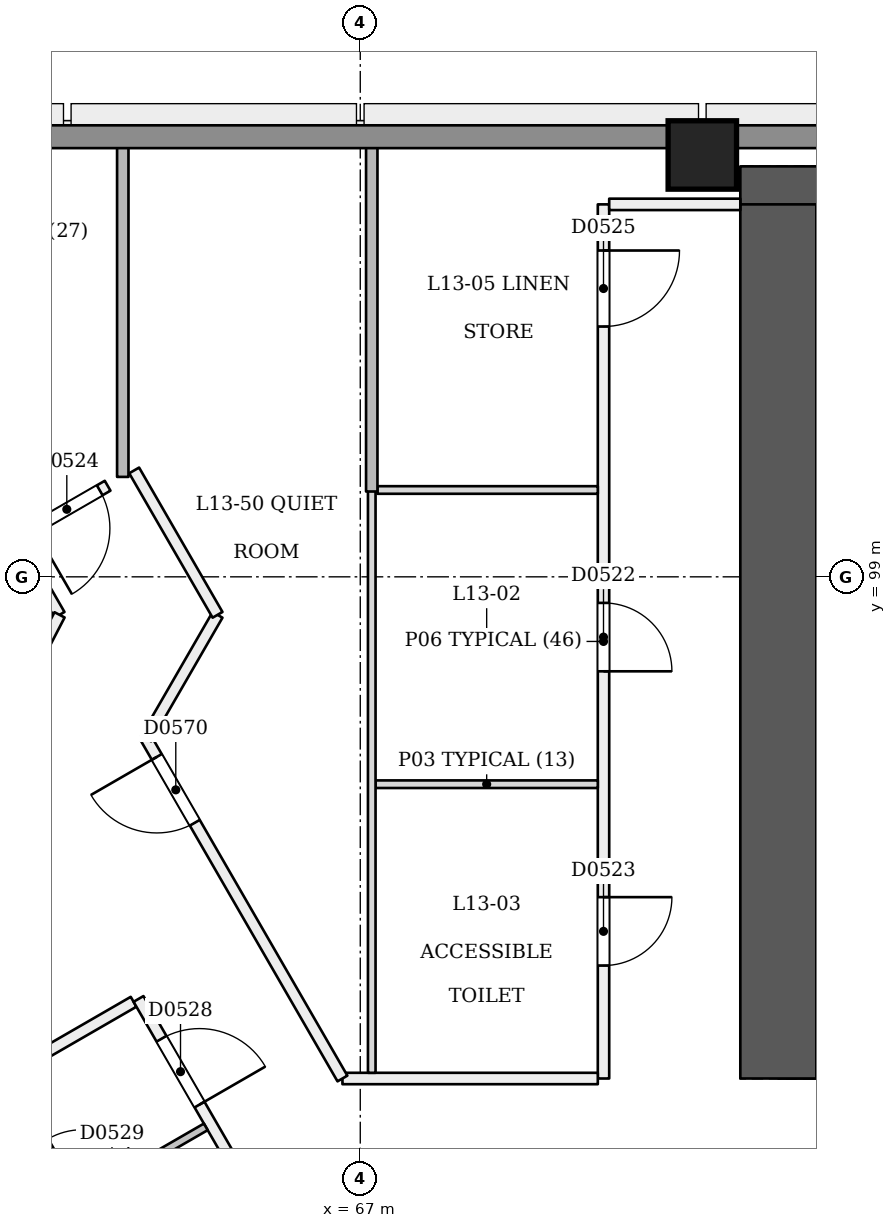
"""IFC4 building model, lengths in metres.
Left out: names, types, materials, properties, quantities, classifications, styles, units other than length and angle.
Written with IfcOpenShell. Run it as: python <this file> out.ifc"""

import sys

from ifc_helpers import new_model, si_unit, direction, frame, frame_2d, origin, origin_2d, place, context, subcontext, project, spatial, rectangle, extrude, element, fill, save


model = new_model("IFC4")
c1 = context("Model", 3, precision=1e-05, world=origin(), true_north=direction((0.0, 1.0)))
c2 = subcontext(c1, "Body", "Model", "MODEL_VIEW")
j1 = project(units=[si_unit("LENGTHUNIT", "METRE"), si_unit("PLANEANGLEUNIT", "RADIAN")], contexts=[c1])
p1 = place(None, origin())
s1 = spatial("IfcSite", under=j1, at=p1, CompositionType="ELEMENT")
p2 = place(p1, origin())
s2 = spatial("IfcBuilding", under=s1, at=p2, CompositionType="ELEMENT")
p3 = place(p2, frame((0.0, 0.0, 55.8)))
s3 = spatial("IfcBuildingStorey", under=s2, at=p3, CompositionType="ELEMENT", Elevation=55.8)
p4 = place(p3, frame((72.5, 92.9, 0.0), z_axis=(0.0, 0.0, 1.0), x_axis=(1.0, 0.0, 0.0)))
e1 = element("IfcWall", 1, at=p4, inside=s3, PredefinedType="SHEAR", context=c2, shape_type="SweptSolid", body=[
    extrude(rectangle(XDim=25.5, YDim=1.0, at=frame_2d((12.75, 0.0))), origin(), (0.0, 0.0, 1.0), 3.6),
])
p5 = place(p4, frame((1.3, 0.0, 0.0)))
e2 = element("IfcOpeningElement", 2, at=p5, cuts=e1, PredefinedType="OPENING", context=c2, shape_type="SweptSolid", body=[
    extrude(rectangle(XDim=1.2, YDim=2.1, at=frame_2d((0.6, 1.05))), frame((0.0, 0.51, 0.0), z_axis=(0.0, -1.0, 0.0), x_axis=(1.0, 0.0, 0.0)), (0.0, 0.0, 1.0), 1.021),
])
p6 = place(p4, frame((3.5, 0.0, 0.0)))
e3 = element("IfcOpeningElement", 3, at=p6, cuts=e1, PredefinedType="OPENING", context=c2, shape_type="SweptSolid", body=[
    extrude(rectangle(XDim=1.2, YDim=2.1, at=frame_2d((0.6, 1.05))), frame((0.0, 0.51, 0.0), z_axis=(0.0, -1.0, 0.0), x_axis=(1.0, 0.0, 0.0)), (0.0, 0.0, 1.0), 1.021),
])
p7 = place(p4, frame((13.5, 0.0, 0.0)))
e4 = element("IfcOpeningElement", 4, at=p7, cuts=e1, PredefinedType="OPENING", context=c2, shape_type="SweptSolid", body=[
    extrude(rectangle(XDim=1.2, YDim=2.1, at=frame_2d((0.6, 1.05))), frame((0.0, 0.51, 0.0), z_axis=(0.0, -1.0, 0.0), x_axis=(1.0, 0.0, 0.0)), (0.0, 0.0, 1.0), 1.021),
])
p8 = place(p4, frame((15.462, 0.0, 0.0)))
e5 = element("IfcOpeningElement", 5, at=p8, cuts=e1, PredefinedType="OPENING", context=c2, shape_type="SweptSolid", body=[
    extrude(rectangle(XDim=1.0, YDim=2.1, at=frame_2d((0.5, 1.05))), frame((0.0, 0.51, 0.0), z_axis=(0.0, -1.0, 0.0), x_axis=(1.0, 0.0, 0.0)), (0.0, 0.0, 1.0), 1.021),
])
p9 = place(p4, frame((18.3, 0.0, 0.0)))
e6 = element("IfcOpeningElement", 6, at=p9, cuts=e1, PredefinedType="OPENING", context=c2, shape_type="SweptSolid", body=[
    extrude(rectangle(XDim=1.0, YDim=2.1, at=frame_2d((0.5, 1.05))), frame((0.0, 0.51, 0.0), z_axis=(0.0, -1.0, 0.0), x_axis=(1.0, 0.0, 0.0)), (0.0, 0.0, 1.0), 1.021),
])
p10 = place(p4, frame((21.2, 0.0, 0.0)))
e7 = element("IfcOpeningElement", 7, at=p10, cuts=e1, PredefinedType="OPENING", context=c2, shape_type="SweptSolid", body=[
    extrude(rectangle(XDim=1.0, YDim=2.1, at=frame_2d((0.5, 1.05))), frame((0.0, 0.51, 0.0), z_axis=(0.0, -1.0, 0.0), x_axis=(1.0, 0.0, 0.0)), (0.0, 0.0, 1.0), 1.021),
])
p11 = place(p4, frame((23.087, 0.0, 0.0)))
e8 = element("IfcOpeningElement", 8, at=p11, cuts=e1, PredefinedType="OPENING", context=c2, shape_type="SweptSolid", body=[
    extrude(rectangle(XDim=1.0, YDim=2.1, at=frame_2d((0.5, 1.05))), frame((0.0, 0.51, 0.0), z_axis=(0.0, -1.0, 0.0), x_axis=(1.0, 0.0, 0.0)), (0.0, 0.0, 1.0), 1.021),
])
p12 = place(p3, frame((97.5, 103.9, 0.0), z_axis=(0.0, 0.0, 1.0), x_axis=(-1.0, 0.0, 0.0)))
e9 = element("IfcWall", 9, at=p12, inside=s3, PredefinedType="SHEAR", context=c2, shape_type="SweptSolid", body=[
    extrude(rectangle(XDim=25.5, YDim=1.0, at=frame_2d((12.75, 0.0))), origin(), (0.0, 0.0, 1.0), 3.6),
])
p13 = place(p3, frame((72.5, 103.9, 0.0), z_axis=(0.0, 0.0, 1.0), x_axis=(0.0, -1.0, 0.0)))
e10 = element("IfcWall", 10, at=p13, inside=s3, PredefinedType="SHEAR", context=c2, shape_type="SweptSolid", body=[
    extrude(rectangle(XDim=11.5, YDim=1.0, at=frame_2d((5.75, 0.0))), origin(), (0.0, 0.0, 1.0), 3.6),
])
p14 = place(p3, frame((71.5, 104.55, 0.0), z_axis=(0.0, 0.0, 1.0), x_axis=(1.0, 0.0, 0.0)))
e11 = element("IfcColumn", 11, at=p14, inside=s3, PredefinedType="COLUMN", context=c2, shape_type="SweptSolid", body=[
    extrude(rectangle(XDim=0.9, YDim=0.9, at=origin_2d()), origin(), (0.0, 0.0, 1.0), 3.6),
])
p15 = place(p3, frame((70.2, 103.9, 0.0), z_axis=(0.0, 0.0, 1.0), x_axis=(0.0, -1.0, 0.0)))
e12 = element("IfcWall", 12, at=p15, inside=s3, PredefinedType="PARTITIONING", context=c2, shape_type="SweptSolid", body=[
    extrude(rectangle(XDim=11.5, YDim=0.15, at=frame_2d((5.75, 0.0))), origin(), (0.0, 0.0, 1.0), 2.6),
])
p16 = place(p15, frame((5.243, 0.0, 0.0)))
e13 = element("IfcOpeningElement", 13, at=p16, cuts=e12, PredefinedType="OPENING", context=c2, shape_type="SweptSolid", body=[
    extrude(rectangle(XDim=0.9, YDim=2.1, at=frame_2d((0.45, 1.05))), frame((0.0, 0.085, 0.0), z_axis=(0.0, -1.0, 0.0), x_axis=(1.0, 0.0, 0.0)), (0.0, 0.0, 1.0), 0.171),
])
p17 = place(p15, frame((9.114, 0.0, 0.0)))
e14 = element("IfcOpeningElement", 14, at=p17, cuts=e12, PredefinedType="OPENING", context=c2, shape_type="SweptSolid", body=[
    extrude(rectangle(XDim=0.9, YDim=2.1, at=frame_2d((0.45, 1.05))), frame((0.0, 0.085, 0.0), z_axis=(0.0, -1.0, 0.0), x_axis=(1.0, 0.0, 0.0)), (0.0, 0.0, 1.0), 0.171),
])
p18 = place(p15, frame((0.607, 0.0, 0.0)))
e15 = element("IfcOpeningElement", 15, at=p18, cuts=e12, PredefinedType="OPENING", context=c2, shape_type="SweptSolid", body=[
    extrude(rectangle(XDim=1.0, YDim=2.1, at=frame_2d((0.5, 1.05))), frame((0.0, 0.085, 0.0), z_axis=(0.0, -1.0, 0.0), x_axis=(1.0, 0.0, 0.0)), (0.0, 0.0, 1.0), 0.171),
])
p19 = place(p3, frame((70.125, 92.4, 0.0), z_axis=(0.0, 0.0, 1.0), x_axis=(-1.0, 0.0, 0.0)))
e16 = element("IfcWall", 16, at=p19, inside=s3, PredefinedType="PARTITIONING", context=c2, shape_type="SweptSolid", body=[
    extrude(rectangle(XDim=3.36, YDim=0.15, at=frame_2d((1.68, 0.0))), origin(), (0.0, 0.0, 1.0), 3.1),
])
p20 = place(p3, frame((63.676, 100.198, 0.0), z_axis=(0.0, 0.0, 1.0), x_axis=(-0.865994851461, -0.500052914442, 0.0)))
e17 = element("IfcWall", 17, at=p20, inside=s3, PredefinedType="PARTITIONING", context=c2, shape_type="SweptSolid", body=[
    extrude(rectangle(XDim=1.322, YDim=0.15, at=frame_2d((0.661, 0.0))), origin(), (0.0, 0.0, 1.0), 3.1),
])
p21 = place(p20, frame((0.12, 0.0, 0.0)))
e18 = element("IfcOpeningElement", 18, at=p21, cuts=e17, PredefinedType="OPENING", context=c2, shape_type="SweptSolid", body=[
    extrude(rectangle(XDim=1.0, YDim=2.1, at=frame_2d((0.5, 1.05))), frame((0.0, 0.085, 0.0), z_axis=(0.0, -1.0, 0.0), x_axis=(1.0, 0.0, 0.0)), (0.0, 0.0, 1.0), 0.171),
])
p22 = place(p3, frame((72.0, 103.9, 0.0), z_axis=(0.0, 0.0, 1.0), x_axis=(-1.0, 0.0, 0.0)))
e19 = element("IfcWall", 19, at=p22, inside=s3, PredefinedType="PARTITIONING", context=c2, shape_type="SweptSolid", body=[
    extrude(rectangle(XDim=1.725, YDim=0.15, at=frame_2d((0.863, 0.0))), origin(), (0.0, 0.0, 1.0), 2.6),
])
p23 = place(p3, frame((62.504, 99.435, 0.0), z_axis=(0.0, 0.0, 1.0), x_axis=(0.499957341738, -0.866050031143, 0.0)))
e20 = element("IfcWall", 20, at=p23, inside=s3, PredefinedType="PARTITIONING", context=c2, shape_type="SweptSolid", body=[
    extrude(rectangle(XDim=1.08, YDim=0.15, at=frame_2d((0.54, 0.0))), origin(), (0.0, 0.0, 1.0), 3.1),
])
p24 = place(p3, frame((63.044, 98.5, 0.0), z_axis=(0.0, 0.0, 1.0), x_axis=(-0.459959252293, -0.887940024005, 0.0)))
e21 = element("IfcWall", 21, at=p24, inside=s3, PredefinedType="PARTITIONING", context=c2, shape_type="SweptSolid", body=[
    extrude(rectangle(XDim=1.932, YDim=0.15, at=frame_2d((0.966, 0.0))), origin(), (0.0, 0.0, 1.0), 3.1),
])
p25 = place(p3, frame((62.628, 92.607, 0.0), z_axis=(0.0, 0.0, 1.0), x_axis=(0.866015857963, 0.500016533484, 0.0)))
e22 = element("IfcWall", 22, at=p25, inside=s3, PredefinedType="PARTITIONING", context=c2, shape_type="SweptSolid", body=[
    extrude(rectangle(XDim=1.605, YDim=0.15, at=frame_2d((0.802, 0.0))), origin(), (0.0, 0.0, 1.0), 3.1),
])
p26 = place(p3, frame((64.083, 93.447, 0.0), z_axis=(0.0, 0.0, 1.0), x_axis=(0.5000018851, -0.866024315419, 0.0)))
e23 = element("IfcWall", 23, at=p26, inside=s3, PredefinedType="PARTITIONING", context=c2, shape_type="SweptSolid", body=[
    extrude(rectangle(XDim=36.0, YDim=0.15, at=frame_2d((18.0, 0.0))), origin(), (0.0, 0.0, 1.0), 2.7),
])
p27 = place(p26, frame((0.605, 0.0, 0.0)))
e24 = element("IfcOpeningElement", 24, at=p27, cuts=e23, PredefinedType="OPENING", context=c2, shape_type="SweptSolid", body=[
    extrude(rectangle(XDim=1.0, YDim=2.1, at=frame_2d((0.5, 1.05))), frame((0.0, 0.085, 0.0), z_axis=(0.0, -1.0, 0.0), x_axis=(1.0, 0.0, 0.0)), (0.0, 0.0, 1.0), 0.171),
])
p28 = place(p26, frame((7.28, 0.0, 0.0)))
e25 = element("IfcOpeningElement", 25, at=p28, cuts=e23, PredefinedType="OPENING", context=c2, shape_type="SweptSolid", body=[
    extrude(rectangle(XDim=1.0, YDim=2.1, at=frame_2d((0.5, 1.05))), frame((0.0, 0.085, 0.0), z_axis=(0.0, -1.0, 0.0), x_axis=(1.0, 0.0, 0.0)), (0.0, 0.0, 1.0), 0.171),
])
p29 = place(p26, frame((9.72, 0.0, 0.0)))
e26 = element("IfcOpeningElement", 26, at=p29, cuts=e23, PredefinedType="OPENING", context=c2, shape_type="SweptSolid", body=[
    extrude(rectangle(XDim=1.0, YDim=2.1, at=frame_2d((0.5, 1.05))), frame((0.0, 0.085, 0.0), z_axis=(0.0, -1.0, 0.0), x_axis=(1.0, 0.0, 0.0)), (0.0, 0.0, 1.0), 0.171),
])
p30 = place(p26, frame((16.395, 0.0, 0.0)))
e27 = element("IfcOpeningElement", 27, at=p30, cuts=e23, PredefinedType="OPENING", context=c2, shape_type="SweptSolid", body=[
    extrude(rectangle(XDim=1.0, YDim=2.1, at=frame_2d((0.5, 1.05))), frame((0.0, 0.085, 0.0), z_axis=(0.0, -1.0, 0.0), x_axis=(1.0, 0.0, 0.0)), (0.0, 0.0, 1.0), 0.171),
])
p31 = place(p26, frame((18.72, 0.0, 0.0)))
e28 = element("IfcOpeningElement", 28, at=p31, cuts=e23, PredefinedType="OPENING", context=c2, shape_type="SweptSolid", body=[
    extrude(rectangle(XDim=1.0, YDim=2.1, at=frame_2d((0.5, 1.05))), frame((0.0, 0.085, 0.0), z_axis=(0.0, -1.0, 0.0), x_axis=(1.0, 0.0, 0.0)), (0.0, 0.0, 1.0), 0.171),
])
p32 = place(p26, frame((25.395, 0.0, 0.0)))
e29 = element("IfcOpeningElement", 29, at=p32, cuts=e23, PredefinedType="OPENING", context=c2, shape_type="SweptSolid", body=[
    extrude(rectangle(XDim=1.0, YDim=2.1, at=frame_2d((0.5, 1.05))), frame((0.0, 0.085, 0.0), z_axis=(0.0, -1.0, 0.0), x_axis=(1.0, 0.0, 0.0)), (0.0, 0.0, 1.0), 0.171),
])
p33 = place(p26, frame((27.605, 0.0, 0.0)))
e30 = element("IfcOpeningElement", 30, at=p33, cuts=e23, PredefinedType="OPENING", context=c2, shape_type="SweptSolid", body=[
    extrude(rectangle(XDim=1.0, YDim=2.1, at=frame_2d((0.5, 1.05))), frame((0.0, 0.085, 0.0), z_axis=(0.0, -1.0, 0.0), x_axis=(1.0, 0.0, 0.0)), (0.0, 0.0, 1.0), 0.171),
])
p34 = place(p26, frame((34.28, 0.0, 0.0)))
e31 = element("IfcOpeningElement", 31, at=p34, cuts=e23, PredefinedType="OPENING", context=c2, shape_type="SweptSolid", body=[
    extrude(rectangle(XDim=1.0, YDim=2.1, at=frame_2d((0.5, 1.05))), frame((0.0, 0.085, 0.0), z_axis=(0.0, -1.0, 0.0), x_axis=(1.0, 0.0, 0.0)), (0.0, 0.0, 1.0), 0.171),
])
p35 = place(p3, frame((66.765, 92.4, 0.0), z_axis=(0.0, 0.0, 1.0), x_axis=(-0.499992497538, 0.86602973529, 0.0)))
e32 = element("IfcWall", 32, at=p35, inside=s3, PredefinedType="PARTITIONING", context=c2, shape_type="SweptSolid", body=[
    extrude(rectangle(XDim=5.165, YDim=0.15, at=frame_2d((2.583, 0.0))), origin(), (0.0, 0.0, 1.0), 3.1),
])
p36 = place(p35, frame((3.885, 0.0, 0.0)))
e33 = element("IfcOpeningElement", 33, at=p36, cuts=e32, PredefinedType="OPENING", context=c2, shape_type="SweptSolid", body=[
    extrude(rectangle(XDim=1.0, YDim=2.1, at=frame_2d((0.5, 1.05))), frame((0.0, 0.085, 0.0), z_axis=(0.0, -1.0, 0.0), x_axis=(1.0, 0.0, 0.0)), (0.0, 0.0, 1.0), 0.171),
])
p37 = place(p3, frame((64.183, 96.873, 0.0), z_axis=(0.0, 0.0, 1.0), x_axis=(0.500052415518, 0.865995139556, 0.0)))
e34 = element("IfcWall", 34, at=p37, inside=s3, PredefinedType="PARTITIONING", context=c2, shape_type="SweptSolid", body=[
    extrude(rectangle(XDim=1.879, YDim=0.15, at=frame_2d((0.939, 0.0))), origin(), (0.0, 0.0, 1.0), 3.1),
])
p38 = place(p3, frame((65.122, 98.5, 0.0), z_axis=(0.0, 0.0, 1.0), x_axis=(-0.500005024956, 0.866022502605, 0.0)))
e35 = element("IfcWall", 35, at=p38, inside=s3, PredefinedType="PARTITIONING", context=c2, shape_type="SweptSolid", body=[
    extrude(rectangle(XDim=2.194, YDim=0.15, at=frame_2d((1.097, 0.0))), origin(), (0.0, 0.0, 1.0), 3.1),
])
p39 = place(p3, frame((67.201, 96.272, 0.0), z_axis=(0.0, 0.0, 1.0), x_axis=(1.0, 0.0, 0.0)))
e36 = element("IfcWall", 36, at=p39, inside=s3, PredefinedType="PARTITIONING", context=c2, shape_type="SweptSolid", body=[
    extrude(rectangle(XDim=2.924, YDim=0.1, at=frame_2d((1.462, 0.0))), origin(), (0.0, 0.0, 1.0), 3.1),
])
p40 = place(p3, frame((70.125, 100.143, 0.0), z_axis=(0.0, 0.0, 1.0), x_axis=(-1.0, 0.0, 0.0)))
e37 = element("IfcWall", 37, at=p40, inside=s3, PredefinedType="PARTITIONING", context=c2, shape_type="SweptSolid", body=[
    extrude(rectangle(XDim=2.899, YDim=0.1, at=frame_2d((1.449, 0.0))), origin(), (0.0, 0.0, 1.0), 3.1),
])
p41 = place(p3, frame((67.151, 100.163, 0.0), z_axis=(0.0, 0.0, 1.0), x_axis=(0.0, -1.0, 0.0)))
e38 = element("IfcWall", 38, at=p41, inside=s3, PredefinedType="PARTITIONING", context=c2, shape_type="SweptSolid", body=[
    extrude(rectangle(XDim=7.688, YDim=0.1, at=frame_2d((3.844, 0.0))), origin(), (0.0, 0.0, 1.0), 3.1),
])
p42 = place(p3, frame((63.875, 100.315, 0.0), z_axis=(0.0, 0.0, 1.0), x_axis=(0.0, 1.0, 0.0)))
e39 = element("IfcWall", 39, at=p42, inside=s3, PredefinedType="PARTITIONING", context=c2, shape_type="SweptSolid", body=[
    extrude(rectangle(XDim=4.585, YDim=0.15, at=frame_2d((2.292, 0.0))), origin(), (0.0, 0.0, 1.0), 2.6),
])
p43 = place(p3, frame((67.151, 104.9, 0.0), z_axis=(0.0, 0.0, 1.0), x_axis=(0.0, -1.0, 0.0)))
e40 = element("IfcWall", 40, at=p43, inside=s3, PredefinedType="PARTITIONING", context=c2, shape_type="SweptSolid", body=[
    extrude(rectangle(XDim=4.777, YDim=0.15, at=frame_2d((2.389, 0.0))), origin(), (0.0, 0.0, 1.0), 2.6),
])
p44 = place(p3, frame((62.435, 90.301, 0.0), z_axis=(0.0, 0.0, 1.0), x_axis=(0.865989585315, 0.500062034277, 0.0)))
e41 = element("IfcWall", 41, at=p44, inside=s3, PredefinedType="PARTITIONING", context=c2, shape_type="SweptSolid", body=[
    extrude(rectangle(XDim=2.925, YDim=0.1, at=frame_2d((1.462, 0.0))), origin(), (0.0, 0.0, 1.0), 3.1),
])
p45 = place(p44, frame((1.05, 0.0, 0.0)))
e42 = element("IfcOpeningElement", 42, at=p45, cuts=e41, PredefinedType="OPENING", context=c2, shape_type="SweptSolid", body=[
    extrude(rectangle(XDim=0.9, YDim=2.1, at=frame_2d((0.45, 1.05))), frame((0.0, 0.061, 0.0), z_axis=(0.0, -1.0, 0.0), x_axis=(1.0, 0.0, 0.0)), (0.0, 0.0, 1.0), 0.121),
])
p46 = place(p3, frame((59.291, 104.79, 0.0), z_axis=(0.0, 0.0, 1.0), x_axis=(1.0, 0.0, 0.0)))
e43 = element("IfcWall", 43, at=p46, inside=s3, PredefinedType="SOLIDWALL", context=c2, shape_type="SweptSolid", body=[
    extrude(rectangle(XDim=51.418, YDim=0.3, at=frame_2d((25.709, 0.0))), origin(), (0.0, 0.0, 1.0), 2.6),
])
p47 = place(p16, origin())
e44 = element("IfcDoor", 44, at=p47, inside=s3, OperationType="SINGLE_SWING_RIGHT", PredefinedType="NOTDEFINED", context=c2, shape_type="SweptSolid", body=[
    extrude(rectangle(XDim=0.9, YDim=2.1, at=frame_2d((0.45, 1.05))), frame((0.0, 0.025, 0.0), z_axis=(0.0, -1.0, 0.0), x_axis=(1.0, 0.0, 0.0)), (0.0, 0.0, 1.0), 0.05),
])
fill(e13, e44)
p48 = place(p17, origin())
e45 = element("IfcDoor", 45, at=p48, inside=s3, OperationType="SINGLE_SWING_LEFT", PredefinedType="NOTDEFINED", context=c2, shape_type="SweptSolid", body=[
    extrude(rectangle(XDim=0.9, YDim=2.1, at=frame_2d((0.45, 1.05))), frame((0.0, 0.025, 0.0), z_axis=(0.0, -1.0, 0.0), x_axis=(1.0, 0.0, 0.0)), (0.0, 0.0, 1.0), 0.05),
])
fill(e14, e45)
p49 = place(p21, origin())
e46 = element("IfcDoor", 46, at=p49, inside=s3, OperationType="SINGLE_SWING_RIGHT", PredefinedType="NOTDEFINED", context=c2, shape_type="SweptSolid", body=[
    extrude(rectangle(XDim=1.0, YDim=2.1, at=frame_2d((0.5, 1.05))), frame((0.0, 0.025, 0.0), z_axis=(0.0, -1.0, 0.0), x_axis=(1.0, 0.0, 0.0)), (0.0, 0.0, 1.0), 0.05),
])
fill(e18, e46)
p50 = place(p18, origin())
e47 = element("IfcDoor", 47, at=p50, inside=s3, OperationType="SINGLE_SWING_LEFT", PredefinedType="NOTDEFINED", context=c2, shape_type="SweptSolid", body=[
    extrude(rectangle(XDim=1.0, YDim=2.1, at=frame_2d((0.5, 1.05))), frame((0.0, 0.025, 0.0), z_axis=(0.0, -1.0, 0.0), x_axis=(1.0, 0.0, 0.0)), (0.0, 0.0, 1.0), 0.05),
])
fill(e15, e47)
p51 = place(p27, origin())
e48 = element("IfcDoor", 48, at=p51, inside=s3, OperationType="SINGLE_SWING_RIGHT", PredefinedType="NOTDEFINED", context=c2, shape_type="SweptSolid", body=[
    extrude(rectangle(XDim=1.0, YDim=2.1, at=frame_2d((0.5, 1.05))), frame((0.0, 0.025, 0.0), z_axis=(0.0, -1.0, 0.0), x_axis=(1.0, 0.0, 0.0)), (0.0, 0.0, 1.0), 0.05),
])
fill(e24, e48)
p52 = place(p36, origin())
e49 = element("IfcDoor", 49, at=p52, inside=s3, OperationType="SINGLE_SWING_RIGHT", PredefinedType="NOTDEFINED", context=c2, shape_type="SweptSolid", body=[
    extrude(rectangle(XDim=1.0, YDim=2.1, at=frame_2d((0.5, 1.05))), frame((0.0, 0.025, 0.0), z_axis=(0.0, -1.0, 0.0), x_axis=(1.0, 0.0, 0.0)), (0.0, 0.0, 1.0), 0.05),
])
fill(e33, e49)
save(model, sys.argv[1])
